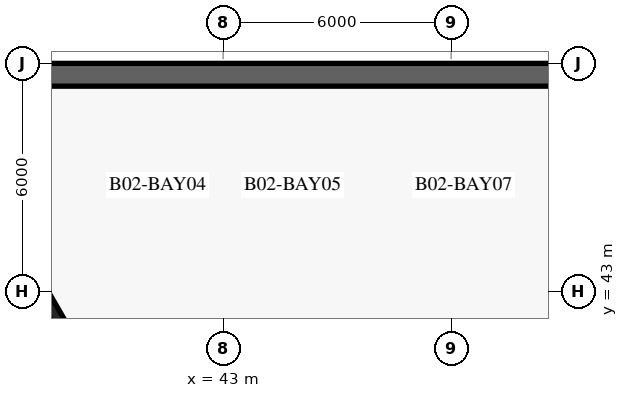
"""IFC4 building model, lengths in metres.
Left out: names, types, materials, properties, quantities, classifications, styles, units other than length and angle.
Written with IfcOpenShell. Run it as: python <this file> out.ifc"""

import sys

from ifc_helpers import new_model, si_unit, direction, frame, frame_2d, origin, origin_2d, place, context, subcontext, project, spatial, rectangle, i_section, extrude, element, save


model = new_model("IFC4")
c1 = context("Model", 3, precision=1e-05, world=origin(), true_north=direction((0.0, 1.0)))
c2 = subcontext(c1, "Body", "Model", "MODEL_VIEW")
j1 = project(units=[si_unit("LENGTHUNIT", "METRE"), si_unit("PLANEANGLEUNIT", "RADIAN")], contexts=[c1])
p1 = place(None, origin())
s1 = spatial("IfcSite", under=j1, at=p1, CompositionType="ELEMENT")
p2 = place(p1, origin())
s2 = spatial("IfcBuilding", under=s1, at=p2, CompositionType="ELEMENT")
p3 = place(p2, frame((0.0, 0.0, -8.4)))
s3 = spatial("IfcBuildingStorey", under=s2, at=p3, CompositionType="ELEMENT", Elevation=-8.4)
p4 = place(p3, frame((75.0, 48.7, 0.0), z_axis=(0.0, 0.0, 1.0), x_axis=(-1.0, 0.0, 0.0)))
e1 = element("IfcWall", 1, at=p4, inside=s3, PredefinedType="USERDEFINED", context=c2, shape_type="SweptSolid", body=[
    extrude(rectangle(XDim=74.0, YDim=0.6, at=frame_2d((37.0, 0.0))), origin(), (0.0, 0.0, 1.0), 3.88),
])
p5 = place(p3, frame((38.531, 42.464, 0.0), z_axis=(0.0, 0.0, 1.0), x_axis=(-0.5, 0.866025403784, 0.0)))
e2 = element("IfcColumn", 2, at=p5, inside=s3, PredefinedType="COLUMN", context=c2, shape_type="SweptSolid", body=[
    extrude(i_section(OverallWidth=0.302, OverallDepth=1.008, WebThickness=0.021, FlangeThickness=0.04, at=origin_2d()), origin(), (0.0, 0.0, 1.0), 4.2),
])
save(model, sys.argv[1])
